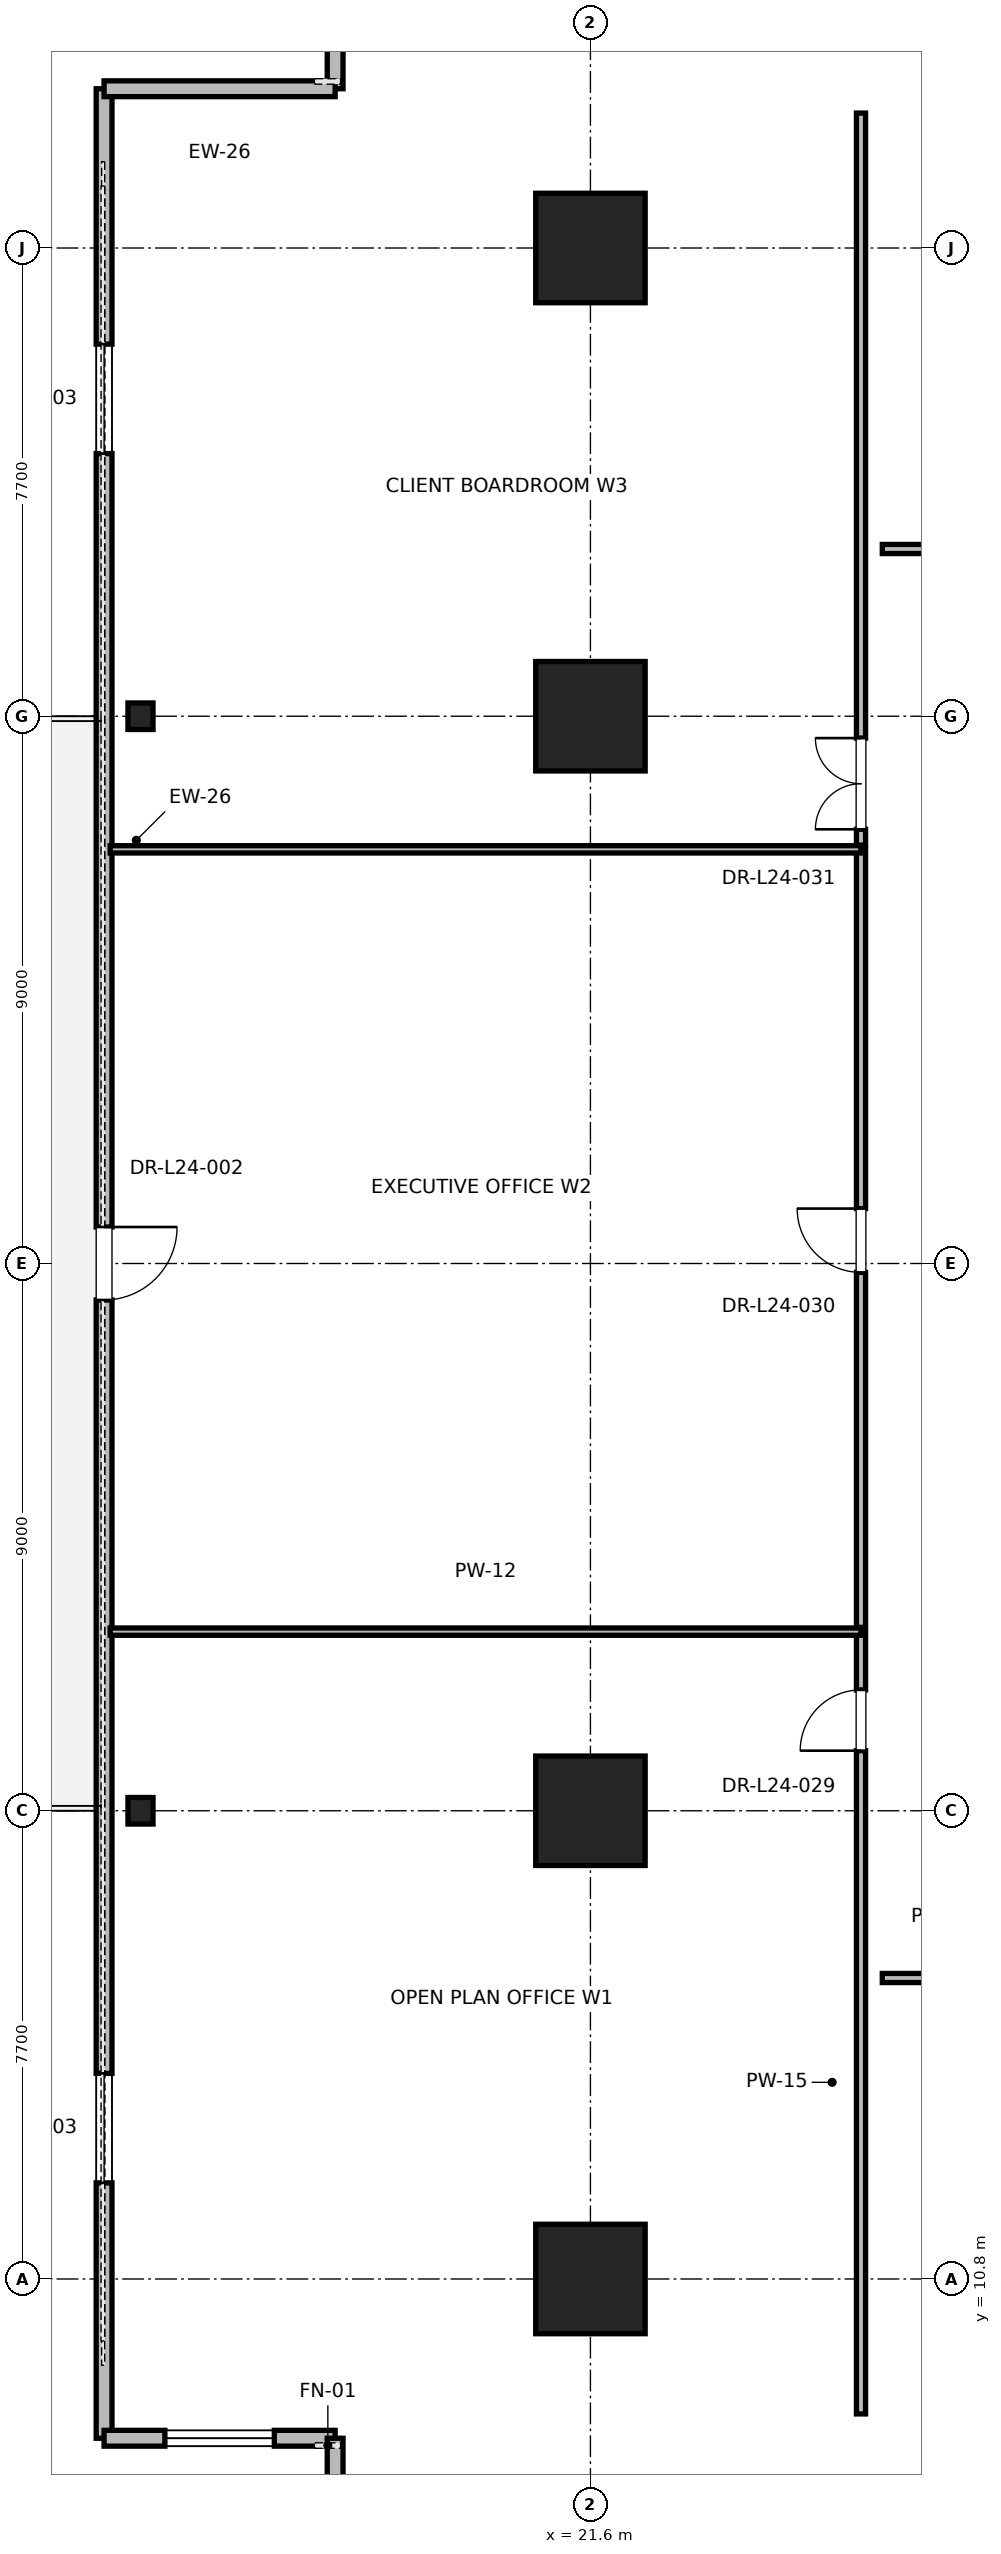
"""IFC4 building model, lengths in metres.
Left out: names, types, materials, properties, quantities, classifications, styles, units other than length and angle.
Written with IfcOpenShell. Run it as: python <this file> out.ifc"""

import sys

from ifc_helpers import new_model, si_unit, direction, frame, frame_2d, origin, origin_2d, place, context, subcontext, project, spatial, rectangle, i_section, extrude, element, fill, save


model = new_model("IFC4")
c1 = context("Model", 3, precision=1e-05, world=origin(), true_north=direction((0.0, 1.0)))
c2 = subcontext(c1, "Body", "Model", "MODEL_VIEW")
j1 = project(units=[si_unit("LENGTHUNIT", "METRE"), si_unit("PLANEANGLEUNIT", "RADIAN")], contexts=[c1])
p1 = place(None, origin())
s1 = spatial("IfcSite", under=j1, at=p1, CompositionType="ELEMENT")
p2 = place(p1, origin())
s2 = spatial("IfcBuilding", under=s1, at=p2, CompositionType="ELEMENT")
p3 = place(p2, frame((0.0, 0.0, 103.6)))
s3 = spatial("IfcBuildingStorey", under=s2, at=p3, CompositionType="ELEMENT", Elevation=103.6)
for number, where, z_axis, x_axis in (
    (1, (21.6, 18.5, 0.0), (0.0, 0.0, 1.0), (1.0, 0.0, 0.0)),
    (2, (21.6, 36.5, 0.0), (0.0, 0.0, 1.0), (1.0, 0.0, 0.0)),
    (3, (21.6, 10.8, 0.0), (0.0, 0.0, 1.0), (1.0, 0.0, 0.0)),
    (4, (21.6, 44.2, 0.0), (0.0, 0.0, 1.0), (1.0, 0.0, 0.0)),
):
    element("IfcColumn", number, at=place(p3, frame(where, z_axis=z_axis, x_axis=x_axis)), inside=s3, PredefinedType="COLUMN", context=c2, shape_type="SweptSolid", body=[
        extrude(rectangle(XDim=1.8, YDim=1.8, at=origin_2d()), origin(), (0.0, 0.0, 1.0), 4.0),
    ])
for number, where, z_axis, x_axis in (
    (5, (14.2, 18.5, 0.0), (0.0, 0.0, 1.0), (1.0, 0.0, 0.0)),
    (6, (14.2, 36.5, 0.0), (0.0, 0.0, 1.0), (1.0, 0.0, 0.0)),
):
    element("IfcColumn", number, at=place(p3, frame(where, z_axis=z_axis, x_axis=x_axis)), inside=s3, PredefinedType="COLUMN", context=c2, shape_type="SweptSolid", body=[
        extrude(i_section(OverallWidth=0.412, OverallDepth=0.437, WebThickness=0.036, FlangeThickness=0.058, FilletRadius=0.015, at=origin_2d()), origin(), (0.0, 0.0, 1.0), 4.0),
    ])
p4 = place(p3, frame((13.601, 46.819, 0.0), z_axis=(0.0, 0.0, 1.0), x_axis=(0.0, -1.0, 0.0)))
e7 = element("IfcWall", 7, at=p4, inside=s3, PredefinedType="PARAPET", context=c2, shape_type="SweptSolid", body=[
    extrude(rectangle(XDim=38.638, YDim=0.26, at=frame_2d((19.319, 0.0))), origin(), (0.0, 0.0, 1.0), 3.7),
])
p5 = place(p4, frame((4.2, 0.0, 0.85)))
e8 = element("IfcOpeningElement", 8, at=p5, cuts=e7, PredefinedType="OPENING", context=c2, shape_type="SweptSolid", body=[
    extrude(rectangle(XDim=1.8, YDim=2.2, at=frame_2d((0.9, 1.1))), frame((0.0, 0.13, 0.0), z_axis=(0.0, -1.0, 0.0), x_axis=(1.0, 0.0, 0.0)), (0.0, 0.0, 1.0), 0.26),
])
p6 = place(p4, frame((18.719, 0.0, 0.0)))
e9 = element("IfcOpeningElement", 9, at=p6, cuts=e7, PredefinedType="OPENING", context=c2, shape_type="SweptSolid", body=[
    extrude(rectangle(XDim=1.2, YDim=2.2, at=frame_2d((0.6, 1.1))), frame((0.0, 0.13, 0.0), z_axis=(0.0, -1.0, 0.0), x_axis=(1.0, 0.0, 0.0)), (0.0, 0.0, 1.0), 0.26),
])
p7 = place(p4, frame((32.638, 0.0, 0.85)))
e10 = element("IfcOpeningElement", 10, at=p7, cuts=e7, PredefinedType="OPENING", context=c2, shape_type="SweptSolid", body=[
    extrude(rectangle(XDim=1.8, YDim=2.2, at=frame_2d((0.9, 1.1))), frame((0.0, 0.13, 0.0), z_axis=(0.0, -1.0, 0.0), x_axis=(1.0, 0.0, 0.0)), (0.0, 0.0, 1.0), 0.26),
])
p8 = place(p3, frame((13.601, 8.181, 0.0), z_axis=(0.0, 0.0, 1.0), x_axis=(1.0, 0.0, 0.0)))
e11 = element("IfcWall", 11, at=p8, inside=s3, PredefinedType="PARAPET", context=c2, shape_type="SweptSolid", body=[
    extrude(rectangle(XDim=3.8, YDim=0.26, at=frame_2d((1.9, 0.0))), origin(), (0.0, 0.0, 1.0), 3.7),
])
p9 = place(p8, frame((1.0, 0.0, 0.85)))
e12 = element("IfcOpeningElement", 12, at=p9, cuts=e11, PredefinedType="OPENING", context=c2, shape_type="SweptSolid", body=[
    extrude(rectangle(XDim=1.8, YDim=2.2, at=frame_2d((0.9, 1.1))), frame((0.0, 0.13, 0.0), z_axis=(0.0, -1.0, 0.0), x_axis=(1.0, 0.0, 0.0)), (0.0, 0.0, 1.0), 0.26),
])
p10 = place(p3, frame((17.401, 8.181, 0.0), z_axis=(0.0, 0.0, 1.0), x_axis=(0.0, -1.0, 0.0)))
e13 = element("IfcWall", 13, at=p10, inside=s3, PredefinedType="PARAPET", context=c2, shape_type="SweptSolid", body=[
    extrude(rectangle(XDim=3.4, YDim=0.26, at=frame_2d((1.7, 0.0))), origin(), (0.0, 0.0, 1.0), 3.7),
])
p11 = place(p3, frame((17.401, 50.219, 0.0), z_axis=(0.0, 0.0, 1.0), x_axis=(0.0, -1.0, 0.0)))
e14 = element("IfcWall", 14, at=p11, inside=s3, PredefinedType="PARAPET", context=c2, shape_type="SweptSolid", body=[
    extrude(rectangle(XDim=3.4, YDim=0.26, at=frame_2d((1.7, 0.0))), origin(), (0.0, 0.0, 1.0), 3.7),
])
p12 = place(p11, frame((0.8, 0.0, 0.85)))
e15 = element("IfcOpeningElement", 15, at=p12, cuts=e14, PredefinedType="OPENING", context=c2, shape_type="SweptSolid", body=[
    extrude(rectangle(XDim=1.8, YDim=2.2, at=frame_2d((0.9, 1.1))), frame((0.0, 0.13, 0.0), z_axis=(0.0, -1.0, 0.0), x_axis=(1.0, 0.0, 0.0)), (0.0, 0.0, 1.0), 0.26),
])
p13 = place(p3, frame((17.401, 46.819, 0.0), z_axis=(0.0, 0.0, 1.0), x_axis=(-1.0, 0.0, 0.0)))
e16 = element("IfcWall", 16, at=p13, inside=s3, PredefinedType="PARAPET", context=c2, shape_type="SweptSolid", body=[
    extrude(rectangle(XDim=3.8, YDim=0.26, at=frame_2d((1.9, 0.0))), origin(), (0.0, 0.0, 1.0), 3.7),
])
p14 = place(p3, frame((26.4, 39.25, 0.0), z_axis=(0.0, 0.0, 1.0), x_axis=(1.0, 0.0, 0.0)))
e17 = element("IfcWall", 17, at=p14, inside=s3, PredefinedType="PARTITIONING", context=c2, shape_type="SweptSolid", body=[
    extrude(rectangle(XDim=8.976, YDim=0.15, at=frame_2d((4.488, 0.0))), origin(), (0.0, 0.0, 1.0), 2.753),
])
p15 = place(p14, frame((4.003, 0.0, 0.0)))
e18 = element("IfcOpeningElement", 18, at=p15, cuts=e17, PredefinedType="OPENING", context=c2, shape_type="SweptSolid", body=[
    extrude(rectangle(XDim=1.0, YDim=2.15, at=frame_2d((0.5, 1.075))), frame((0.0, 0.075, 0.0), z_axis=(0.0, -1.0, 0.0), x_axis=(1.0, 0.0, 0.0)), (0.0, 0.0, 1.0), 0.15),
])
p16 = place(p3, frame((26.4, 15.75, 0.0), z_axis=(0.0, 0.0, 1.0), x_axis=(1.0, 0.0, 0.0)))
e19 = element("IfcWall", 19, at=p16, inside=s3, PredefinedType="PARTITIONING", context=c2, shape_type="SweptSolid", body=[
    extrude(rectangle(XDim=4.896, YDim=0.15, at=frame_2d((2.448, 0.0))), origin(), (0.0, 0.0, 1.0), 2.753),
])
p17 = place(p16, frame((1.963, 0.0, 0.0)))
e20 = element("IfcOpeningElement", 20, at=p17, cuts=e19, PredefinedType="OPENING", context=c2, shape_type="SweptSolid", body=[
    extrude(rectangle(XDim=1.0, YDim=2.15, at=frame_2d((0.5, 1.075))), frame((0.0, 0.075, 0.0), z_axis=(0.0, -1.0, 0.0), x_axis=(1.0, 0.0, 0.0)), (0.0, 0.0, 1.0), 0.15),
])
p18 = place(p3, frame((26.05, 8.581, 0.0), z_axis=(0.0, 0.0, 1.0), x_axis=(0.0, 1.0, 0.0)))
e21 = element("IfcWall", 21, at=p18, inside=s3, PredefinedType="PARTITIONING", context=c2, shape_type="SweptSolid", body=[
    extrude(rectangle(XDim=12.865, YDim=0.15, at=frame_2d((6.432, 0.0))), origin(), (0.0, 0.0, 1.0), 2.753),
])
p19 = place(p18, frame((10.907, 0.0, 0.0)))
e22 = element("IfcOpeningElement", 22, at=p19, cuts=e21, PredefinedType="OPENING", context=c2, shape_type="SweptSolid", body=[
    extrude(rectangle(XDim=1.0, YDim=2.15, at=frame_2d((0.5, 1.075))), frame((0.0, 0.075, 0.0), z_axis=(0.0, -1.0, 0.0), x_axis=(1.0, 0.0, 0.0)), (0.0, 0.0, 1.0), 0.15),
])
p20 = place(p3, frame((13.701, 21.446, 0.0), z_axis=(0.0, 0.0, 1.0), x_axis=(1.0, 0.0, 0.0)))
e23 = element("IfcWall", 23, at=p20, inside=s3, PredefinedType="PARTITIONING", context=c2, shape_type="SweptSolid", body=[
    extrude(rectangle(XDim=12.349, YDim=0.12, at=frame_2d((6.174, 0.0))), origin(), (0.0, 0.0, 1.0), 2.753),
])
p21 = place(p3, frame((26.05, 21.516, 0.0), z_axis=(0.0, 0.0, 1.0), x_axis=(0.0, 1.0, 0.0)))
e24 = element("IfcWall", 24, at=p21, inside=s3, PredefinedType="PARTITIONING", context=c2, shape_type="SweptSolid", body=[
    extrude(rectangle(XDim=12.795, YDim=0.15, at=frame_2d((6.397, 0.0))), origin(), (0.0, 0.0, 1.0), 2.85),
])
p22 = place(p21, frame((5.837, 0.0, 0.0)))
e25 = element("IfcOpeningElement", 25, at=p22, cuts=e24, PredefinedType="OPENING", context=c2, shape_type="SweptSolid", body=[
    extrude(rectangle(XDim=1.05, YDim=2.2, at=frame_2d((0.525, 1.1))), frame((0.0, 0.075, 0.0), z_axis=(0.0, -1.0, 0.0), x_axis=(1.0, 0.0, 0.0)), (0.0, 0.0, 1.0), 0.15),
])
p23 = place(p3, frame((13.701, 34.311, 0.0), z_axis=(0.0, 0.0, 1.0), x_axis=(1.0, 0.0, 0.0)))
e26 = element("IfcWall", 26, at=p23, inside=s3, PredefinedType="PARTITIONING", context=c2, shape_type="SweptSolid", body=[
    extrude(rectangle(XDim=12.349, YDim=0.12, at=frame_2d((6.174, 0.0))), origin(), (0.0, 0.0, 1.0), 2.753),
])
p24 = place(p3, frame((26.05, 34.381, 0.0), z_axis=(0.0, 0.0, 1.0), x_axis=(0.0, 1.0, 0.0)))
e27 = element("IfcWall", 27, at=p24, inside=s3, PredefinedType="PARTITIONING", context=c2, shape_type="SweptSolid", body=[
    extrude(rectangle(XDim=12.038, YDim=0.15, at=frame_2d((6.019, 0.0))), origin(), (0.0, 0.0, 1.0), 2.753),
])
p25 = place(p24, frame((0.26, 0.0, 0.0)))
e28 = element("IfcOpeningElement", 28, at=p25, cuts=e27, PredefinedType="OPENING", context=c2, shape_type="SweptSolid", body=[
    extrude(rectangle(XDim=1.5, YDim=2.25, at=frame_2d((0.75, 1.125))), frame((0.0, 0.075, 0.0), z_axis=(0.0, -1.0, 0.0), x_axis=(1.0, 0.0, 0.0)), (0.0, 0.0, 1.0), 0.15),
])
p26 = place(p5, origin())
e29 = element("IfcWindow", 29, at=p26, inside=s3, PartitioningType="SINGLE_PANEL", PredefinedType="WINDOW", context=c2, shape_type="SweptSolid", body=[
    extrude(rectangle(XDim=1.8, YDim=2.2, at=frame_2d((0.9, 1.1))), frame((0.0, 0.03, 0.0), z_axis=(0.0, -1.0, 0.0), x_axis=(1.0, 0.0, 0.0)), (0.0, 0.0, 1.0), 0.06),
])
fill(e8, e29)
p27 = place(p6, origin())
e30 = element("IfcDoor", 30, at=p27, inside=s3, OperationType="SINGLE_SWING_LEFT", PredefinedType="DOOR", context=c2, shape_type="SweptSolid", body=[
    extrude(rectangle(XDim=1.2, YDim=2.2, at=frame_2d((0.6, 1.1))), frame((0.0, 0.025, 0.0), z_axis=(0.0, -1.0, 0.0), x_axis=(1.0, 0.0, 0.0)), (0.0, 0.0, 1.0), 0.05),
])
fill(e9, e30)
p28 = place(p7, origin())
e31 = element("IfcWindow", 31, at=p28, inside=s3, PartitioningType="SINGLE_PANEL", PredefinedType="WINDOW", context=c2, shape_type="SweptSolid", body=[
    extrude(rectangle(XDim=1.8, YDim=2.2, at=frame_2d((0.9, 1.1))), frame((0.0, 0.03, 0.0), z_axis=(0.0, -1.0, 0.0), x_axis=(1.0, 0.0, 0.0)), (0.0, 0.0, 1.0), 0.06),
])
fill(e10, e31)
p29 = place(p9, origin())
e32 = element("IfcWindow", 32, at=p29, inside=s3, PartitioningType="SINGLE_PANEL", PredefinedType="WINDOW", context=c2, shape_type="SweptSolid", body=[
    extrude(rectangle(XDim=1.8, YDim=2.2, at=frame_2d((0.9, 1.1))), frame((0.0, 0.03, 0.0), z_axis=(0.0, -1.0, 0.0), x_axis=(1.0, 0.0, 0.0)), (0.0, 0.0, 1.0), 0.06),
])
fill(e12, e32)
p30 = place(p19, origin())
e33 = element("IfcDoor", 33, at=p30, inside=s3, OperationType="SINGLE_SWING_LEFT", PredefinedType="DOOR", context=c2, shape_type="SweptSolid", body=[
    extrude(rectangle(XDim=1.0, YDim=2.15, at=frame_2d((0.5, 1.075))), frame((0.0, 0.025, 0.0), z_axis=(0.0, -1.0, 0.0), x_axis=(1.0, 0.0, 0.0)), (0.0, 0.0, 1.0), 0.05),
])
fill(e22, e33)
p31 = place(p22, origin())
e34 = element("IfcDoor", 34, at=p31, inside=s3, OperationType="SINGLE_SWING_RIGHT", PredefinedType="DOOR", context=c2, shape_type="SweptSolid", body=[
    extrude(rectangle(XDim=1.05, YDim=2.2, at=frame_2d((0.525, 1.1))), frame((0.0, 0.025, 0.0), z_axis=(0.0, -1.0, 0.0), x_axis=(1.0, 0.0, 0.0)), (0.0, 0.0, 1.0), 0.05),
])
fill(e25, e34)
p32 = place(p25, origin())
e35 = element("IfcDoor", 35, at=p32, inside=s3, OperationType="DOUBLE_DOOR_SINGLE_SWING", PredefinedType="DOOR", context=c2, shape_type="SweptSolid", body=[
    extrude(rectangle(XDim=1.5, YDim=2.25, at=frame_2d((0.75, 1.125))), frame((0.0, 0.025, 0.0), z_axis=(0.0, -1.0, 0.0), x_axis=(1.0, 0.0, 0.0)), (0.0, 0.0, 1.0), 0.05),
])
fill(e28, e35)
save(model, sys.argv[1])
